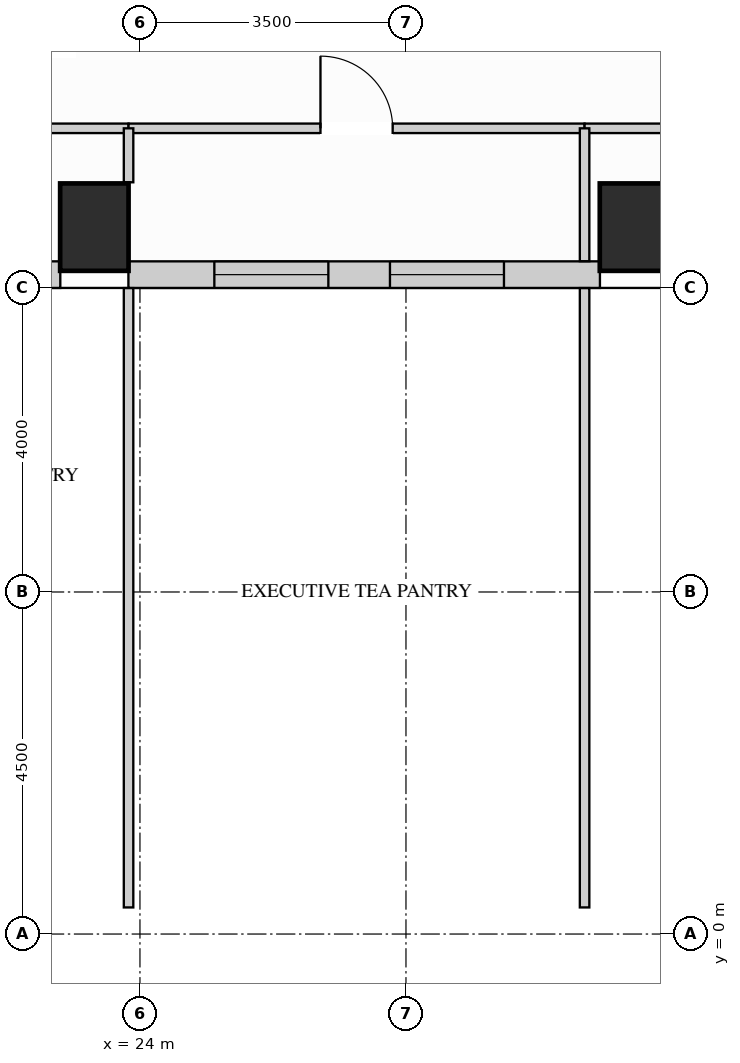
"""IFC4 building model, lengths in metres.
Left out: names, types, materials, properties, quantities, classifications, styles, units other than length and angle.
Written with IfcOpenShell. Run it as: python <this file> out.ifc"""

import sys

from ifc_helpers import new_model, si_unit, direction, frame, frame_2d, origin, origin_2d, place, context, subcontext, project, spatial, rectangle, extrude, source, transform, mapped, element, fill, save


model = new_model("IFC4")
c1 = context("Model", 3, precision=1e-05, world=origin(), true_north=direction((0.0, 1.0)))
c2 = subcontext(c1, "Body", "Model", "MODEL_VIEW")
j1 = project(units=[si_unit("LENGTHUNIT", "METRE"), si_unit("PLANEANGLEUNIT", "RADIAN")], contexts=[c1])
p1 = place(None, origin())
s1 = spatial("IfcSite", under=j1, at=p1, CompositionType="ELEMENT")
p2 = place(p1, origin())
s2 = spatial("IfcBuilding", under=s1, at=p2, CompositionType="ELEMENT")
p3 = place(p2, frame((0.0, 0.0, 88.2)))
s3 = spatial("IfcBuildingStorey", under=s2, at=p3, CompositionType="ELEMENT", Elevation=88.2)
m1 = source(origin(), c2, "Body", "SweptSolid", [
    extrude(rectangle(XDim=0.9, YDim=1.15, at=origin_2d()), origin(), (0.0, 0.0, 1.0), 3.38),
])
for number, where, z_axis, x_axis in (
    (1, (23.4, 9.3, 0.0), (0.0, 0.0, 1.0), (1.0, 0.0, 0.0)),
    (2, (30.5, 9.3, 0.0), (0.0, 0.0, 1.0), (1.0, 0.0, 0.0)),
):
    element("IfcColumn", number, at=place(p3, frame(where, z_axis=z_axis, x_axis=x_axis)), inside=s3, PredefinedType="COLUMN", context=c2, shape_type="MappedRepresentation", body=[
        mapped(m1, transform((0.0, 0.0, 0.0), x_axis=(1.0, 0.0, 0.0), y_axis=(0.0, 1.0, 0.0), z_axis=(0.0, 0.0, 1.0))),
    ])
p4 = place(p3, frame((19.448, 8.675, 0.0), z_axis=(0.0, 0.0, 1.0), x_axis=(1.0, 0.0, 0.0)))
e3 = element("IfcWall", 3, at=p4, inside=s3, PredefinedType="SOLIDWALL", context=c2, shape_type="SweptSolid", body=[
    extrude(rectangle(XDim=3.504, YDim=0.35, at=frame_2d((1.752, 0.0))), origin(), (0.0, 0.0, 1.0), 3.365),
])
p5 = place(p4, frame((1.002, 0.0, 0.78)))
e4 = element("IfcOpeningElement", 4, at=p5, cuts=e3, PredefinedType="OPENING", context=c2, shape_type="SweptSolid", body=[
    extrude(rectangle(XDim=1.5, YDim=2.0, at=frame_2d((0.75, 1.0))), frame((0.0, 0.185, 0.0), z_axis=(0.0, -1.0, 0.0), x_axis=(1.0, 0.0, 0.0)), (0.0, 0.0, 1.0), 0.37),
])
p6 = place(p3, frame((23.848, 8.675, 0.0), z_axis=(0.0, 0.0, 1.0), x_axis=(1.0, 0.0, 0.0)))
e5 = element("IfcWall", 5, at=p6, inside=s3, PredefinedType="SOLIDWALL", context=c2, shape_type="SweptSolid", body=[
    extrude(rectangle(XDim=6.204, YDim=0.35, at=frame_2d((3.102, 0.0))), origin(), (0.0, 0.0, 1.0), 3.365),
])
p7 = place(p6, frame((1.131, 0.0, 0.78)))
e6 = element("IfcOpeningElement", 6, at=p7, cuts=e5, PredefinedType="OPENING", context=c2, shape_type="SweptSolid", body=[
    extrude(rectangle(XDim=1.5, YDim=2.0, at=frame_2d((0.75, 1.0))), frame((0.0, 0.185, 0.0), z_axis=(0.0, -1.0, 0.0), x_axis=(1.0, 0.0, 0.0)), (0.0, 0.0, 1.0), 0.37),
])
p8 = place(p6, frame((3.441, 0.0, 0.78)))
e7 = element("IfcOpeningElement", 7, at=p8, cuts=e5, PredefinedType="OPENING", context=c2, shape_type="SweptSolid", body=[
    extrude(rectangle(XDim=1.5, YDim=2.0, at=frame_2d((0.75, 1.0))), frame((0.0, 0.185, 0.0), z_axis=(0.0, -1.0, 0.0), x_axis=(1.0, 0.0, 0.0)), (0.0, 0.0, 1.0), 0.37),
])
p9 = place(p3, frame((19.5, 10.6, 0.0), z_axis=(0.0, 0.0, 1.0), x_axis=(1.0, 0.0, 0.0)))
e8 = element("IfcWall", 8, at=p9, inside=s3, PredefinedType="PARTITIONING", context=c2, shape_type="SweptSolid", body=[
    extrude(rectangle(XDim=4.35, YDim=0.125, at=frame_2d((2.175, 0.0))), origin(), (0.0, 0.0, 1.0), 3.365),
])
p10 = place(p9, frame((1.7, 0.0, 0.0)))
e9 = element("IfcOpeningElement", 9, at=p10, cuts=e8, PredefinedType="OPENING", context=c2, shape_type="SweptSolid", body=[
    extrude(rectangle(XDim=0.95, YDim=2.15, at=frame_2d((0.475, 1.075))), frame((0.0, 0.073, 0.0), z_axis=(0.0, -1.0, 0.0), x_axis=(1.0, 0.0, 0.0)), (0.0, 0.0, 1.0), 0.145),
])
p11 = place(p3, frame((23.85, 10.6, 0.0), z_axis=(0.0, 0.0, 1.0), x_axis=(1.0, 0.0, 0.0)))
e10 = element("IfcWall", 10, at=p11, inside=s3, PredefinedType="PARTITIONING", context=c2, shape_type="SweptSolid", body=[
    extrude(rectangle(XDim=6.0, YDim=0.125, at=frame_2d((3.0, 0.0))), origin(), (0.0, 0.0, 1.0), 3.365),
])
p12 = place(p11, frame((2.525, 0.0, 0.0)))
e11 = element("IfcOpeningElement", 11, at=p12, cuts=e10, PredefinedType="OPENING", context=c2, shape_type="SweptSolid", body=[
    extrude(rectangle(XDim=0.95, YDim=2.15, at=frame_2d((0.475, 1.075))), frame((0.0, 0.073, 0.0), z_axis=(0.0, -1.0, 0.0), x_axis=(1.0, 0.0, 0.0)), (0.0, 0.0, 1.0), 0.145),
])
p13 = place(p3, frame((29.85, 10.6, 0.0), z_axis=(0.0, 0.0, 1.0), x_axis=(1.0, 0.0, 0.0)))
e12 = element("IfcWall", 12, at=p13, inside=s3, PredefinedType="PARTITIONING", context=c2, shape_type="SweptSolid", body=[
    extrude(rectangle(XDim=4.55, YDim=0.125, at=frame_2d((2.275, 0.0))), origin(), (0.0, 0.0, 1.0), 3.365),
])
p14 = place(p13, frame((1.8, 0.0, 0.0)))
e13 = element("IfcOpeningElement", 13, at=p14, cuts=e12, PredefinedType="OPENING", context=c2, shape_type="SweptSolid", body=[
    extrude(rectangle(XDim=0.95, YDim=2.15, at=frame_2d((0.475, 1.075))), frame((0.0, 0.073, 0.0), z_axis=(0.0, -1.0, 0.0), x_axis=(1.0, 0.0, 0.0)), (0.0, 0.0, 1.0), 0.145),
])
m2 = source(origin(), c2, "Body", "SweptSolid", [
    extrude(rectangle(XDim=8.148, YDim=0.125, at=frame_2d((4.074, 0.0))), origin(), (0.0, 0.0, 1.0), 3.365),
])
p15 = place(p3, frame((23.85, 0.35, 0.0), z_axis=(0.0, 0.0, 1.0), x_axis=(0.0, 1.0, 0.0)))
e14 = element("IfcWall", 14, at=p15, inside=s3, PredefinedType="PARTITIONING", context=c2, shape_type="MappedRepresentation", body=[
    mapped(m2, transform((0.0, 0.0, 0.0), x_axis=(1.0, 0.0, 0.0), y_axis=(0.0, 1.0, 0.0), z_axis=(0.0, 0.0, 1.0))),
])
m3 = source(origin(), c2, "Body", "SweptSolid", [
    extrude(rectangle(XDim=0.71, YDim=0.125, at=frame_2d((0.355, 0.0))), origin(), (0.0, 0.0, 1.0), 3.365),
])
p16 = place(p3, frame((23.85, 9.89, 0.0), z_axis=(0.0, 0.0, 1.0), x_axis=(0.0, 1.0, 0.0)))
e15 = element("IfcWall", 15, at=p16, inside=s3, PredefinedType="PARTITIONING", context=c2, shape_type="MappedRepresentation", body=[
    mapped(m3, transform((0.0, 0.0, 0.0), x_axis=(1.0, 0.0, 0.0), y_axis=(0.0, 1.0, 0.0), z_axis=(0.0, 0.0, 1.0))),
])
p17 = place(p3, frame((29.85, 0.35, 0.0), z_axis=(0.0, 0.0, 1.0), x_axis=(0.0, 1.0, 0.0)))
e16 = element("IfcWall", 16, at=p17, inside=s3, PredefinedType="PARTITIONING", context=c2, shape_type="MappedRepresentation", body=[
    mapped(m2, transform((0.0, 0.0, 0.0), x_axis=(1.0, 0.0, 0.0), y_axis=(0.0, 1.0, 0.0), z_axis=(0.0, 0.0, 1.0))),
])
m4 = source(origin(), c2, "Body", "SweptSolid", [
    extrude(rectangle(XDim=1.748, YDim=0.125, at=frame_2d((0.874, 0.0))), origin(), (0.0, 0.0, 1.0), 3.365),
])
p18 = place(p3, frame((29.85, 8.852, 0.0), z_axis=(0.0, 0.0, 1.0), x_axis=(0.0, 1.0, 0.0)))
e17 = element("IfcWall", 17, at=p18, inside=s3, PredefinedType="PARTITIONING", context=c2, shape_type="MappedRepresentation", body=[
    mapped(m4, transform((0.0, 0.0, 0.0), x_axis=(1.0, 0.0, 0.0), y_axis=(0.0, 1.0, 0.0), z_axis=(0.0, 0.0, 1.0))),
])
m5 = source(origin(), c2, "Body", "SweptSolid", [
    extrude(rectangle(XDim=0.95, YDim=2.15, at=frame_2d((0.475, 1.075))), frame((0.0, 0.025, 0.0), z_axis=(0.0, -1.0, 0.0), x_axis=(1.0, 0.0, 0.0)), (0.0, 0.0, 1.0), 0.05),
])
p19 = place(p12, origin())
e18 = element("IfcDoor", 18, at=p19, inside=s3, OperationType="SINGLE_SWING_LEFT", PredefinedType="DOOR", context=c2, shape_type="MappedRepresentation", body=[
    mapped(m5, transform((0.0, 0.0, 0.0), x_axis=(1.0, 0.0, 0.0), y_axis=(0.0, 1.0, 0.0), z_axis=(0.0, 0.0, 1.0))),
])
fill(e11, e18)
m6 = source(origin(), c2, "Body", "SweptSolid", [
    extrude(rectangle(XDim=1.5, YDim=2.0, at=frame_2d((0.75, 1.0))), frame((0.0, 0.03, 0.0), z_axis=(0.0, -1.0, 0.0), x_axis=(1.0, 0.0, 0.0)), (0.0, 0.0, 1.0), 0.06),
])
p20 = place(p7, origin())
e19 = element("IfcWindow", 19, at=p20, inside=s3, PartitioningType="SINGLE_PANEL", PredefinedType="WINDOW", context=c2, shape_type="MappedRepresentation", body=[
    mapped(m6, transform((0.0, 0.0, 0.0), x_axis=(1.0, 0.0, 0.0), y_axis=(0.0, 1.0, 0.0), z_axis=(0.0, 0.0, 1.0))),
])
fill(e6, e19)
p21 = place(p8, origin())
e20 = element("IfcWindow", 20, at=p21, inside=s3, PartitioningType="SINGLE_PANEL", PredefinedType="WINDOW", context=c2, shape_type="MappedRepresentation", body=[
    mapped(m6, transform((0.0, 0.0, 0.0), x_axis=(1.0, 0.0, 0.0), y_axis=(0.0, 1.0, 0.0), z_axis=(0.0, 0.0, 1.0))),
])
fill(e7, e20)
save(model, sys.argv[1])
